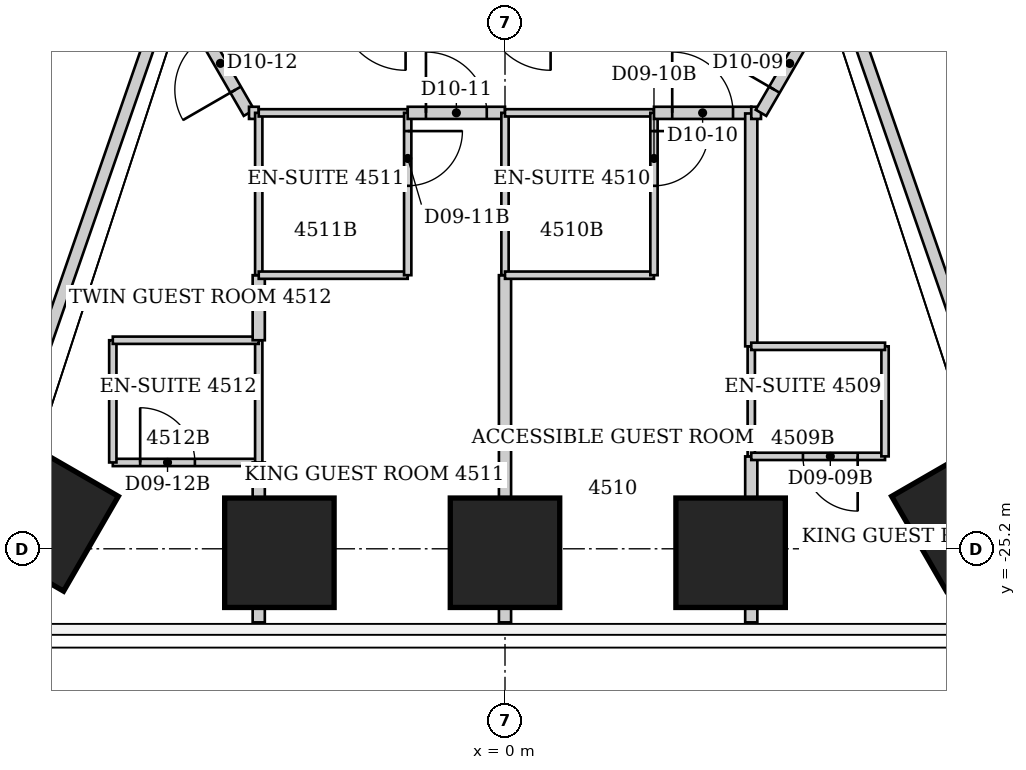
"""IFC4 building model, lengths in metres.
Left out: names, types, materials, properties, quantities, classifications, styles, units other than length and angle.
Written with IfcOpenShell. Run it as: python <this file> out.ifc"""

import sys

from ifc_helpers import new_model, si_unit, direction, frame, frame_2d, origin, origin_2d, place, context, subcontext, project, spatial, rectangle, extrude, element, fill, save


model = new_model("IFC4")
c1 = context("Model", 3, precision=1e-05, world=origin(), true_north=direction((0.0, 1.0)))
c2 = subcontext(c1, "Body", "Model", "MODEL_VIEW")
j1 = project(units=[si_unit("LENGTHUNIT", "METRE"), si_unit("PLANEANGLEUNIT", "RADIAN")], contexts=[c1])
p1 = place(None, origin())
s1 = spatial("IfcSite", under=j1, at=p1, CompositionType="ELEMENT")
p2 = place(p1, origin())
s2 = spatial("IfcBuilding", under=s1, at=p2, CompositionType="ELEMENT")
p3 = place(p2, frame((0.0, 0.0, 183.2)))
s3 = spatial("IfcBuildingStorey", under=s2, at=p3, CompositionType="ELEMENT", Elevation=183.2)
p4 = place(p3, frame((7.979, -24.442, 0.0), z_axis=(0.0, 0.0, 1.0), x_axis=(0.5, -0.866025403784, 0.0)))
e1 = element("IfcColumn", 1, at=p4, inside=s3, PredefinedType="COLUMN", context=c2, shape_type="SweptSolid", body=[
    extrude(rectangle(XDim=1.8, YDim=2.7, at=origin_2d()), origin(), (0.0, 0.0, 1.0), 3.8),
])
for number, where, z_axis, x_axis in (
    (2, (3.71, -25.265, 0.0), (0.0, 0.0, 1.0), (0.0, -1.0, 0.0)),
    (3, (0.0, -25.265, 0.0), (0.0, 0.0, 1.0), (0.0, -1.0, 0.0)),
    (4, (-3.71, -25.265, 0.0), (0.0, 0.0, 1.0), (0.0, -1.0, 0.0)),
):
    element("IfcColumn", number, at=place(p3, frame(where, z_axis=z_axis, x_axis=x_axis)), inside=s3, PredefinedType="COLUMN", context=c2, shape_type="SweptSolid", body=[
        extrude(rectangle(XDim=1.8, YDim=1.8, at=origin_2d()), origin(), (0.0, 0.0, 1.0), 3.8),
    ])
p5 = place(p3, frame((-7.979, -24.442, 0.0), z_axis=(0.0, 0.0, 1.0), x_axis=(-0.5, -0.866025403784, 0.0)))
e5 = element("IfcColumn", 5, at=p5, inside=s3, PredefinedType="COLUMN", context=c2, shape_type="SweptSolid", body=[
    extrude(rectangle(XDim=1.8, YDim=2.7, at=origin_2d()), origin(), (0.0, 0.0, 1.0), 3.8),
])
p6 = place(p3, frame((-9.01, -26.012, 0.0), z_axis=(0.0, 0.0, 1.0), x_axis=(0.327582991606, 0.944822408504, 0.0)))
e6 = element("IfcWall", 6, at=p6, inside=s3, PredefinedType="PARTITIONING", context=c2, shape_type="SweptSolid", body=[
    extrude(rectangle(XDim=10.667, YDim=0.2, at=frame_2d((5.333, 0.0))), origin(), (0.0, 0.0, 1.0), 3.64),
])
p7 = place(p3, frame((-6.45, -23.78, 0.0), z_axis=(0.0, 0.0, 1.0), x_axis=(1.0, 0.0, 0.0)))
e7 = element("IfcWall", 7, at=p7, inside=s3, PredefinedType="PARTITIONING", context=c2, shape_type="SweptSolid", body=[
    extrude(rectangle(XDim=2.4, YDim=0.12, at=frame_2d((1.2, 0.0))), origin(), (0.0, 0.0, 1.0), 3.64),
])
p8 = place(p7, frame((0.45, 0.0, 0.0)))
e8 = element("IfcOpeningElement", 8, at=p8, cuts=e7, PredefinedType="OPENING", context=c2, shape_type="SweptSolid", body=[
    extrude(rectangle(XDim=0.9, YDim=2.03, at=frame_2d((0.45, 1.015))), frame((0.0, 0.06, 0.0), z_axis=(0.0, -1.0, 0.0), x_axis=(1.0, 0.0, 0.0)), (0.0, 0.0, 1.0), 0.12),
])
p9 = place(p3, frame((-6.45, -21.77, 0.0), z_axis=(0.0, 0.0, 1.0), x_axis=(0.0, -1.0, 0.0)))
e9 = element("IfcWall", 9, at=p9, inside=s3, PredefinedType="PARTITIONING", context=c2, shape_type="SweptSolid", body=[
    extrude(rectangle(XDim=2.01, YDim=0.12, at=frame_2d((1.005, 0.0))), origin(), (0.0, 0.0, 1.0), 3.64),
])
p10 = place(p3, frame((-5.48, -15.83, 0.0), z_axis=(0.0, 0.0, 1.0), x_axis=(0.499963722229, -0.866046347752, 0.0)))
e10 = element("IfcWall", 10, at=p10, inside=s3, PredefinedType="PARTITIONING", context=c2, shape_type="SweptSolid", body=[
    extrude(rectangle(XDim=2.54, YDim=0.2, at=frame_2d((1.27, 0.0))), origin(), (0.0, 0.0, 1.0), 3.64),
])
p11 = place(p10, frame((1.1, 0.0, 0.0)))
e11 = element("IfcOpeningElement", 11, at=p11, cuts=e10, PredefinedType="OPENING", context=c2, shape_type="SweptSolid", body=[
    extrude(rectangle(XDim=1.0, YDim=2.13, at=frame_2d((0.5, 1.065))), frame((0.0, 0.1, 0.0), z_axis=(0.0, -1.0, 0.0), x_axis=(1.0, 0.0, 0.0)), (0.0, 0.0, 1.0), 0.2),
])
p12 = place(p3, frame((-4.21, -18.03, 0.0), z_axis=(0.0, 0.0, 1.0), x_axis=(1.0, 0.0, 0.0)))
e12 = element("IfcWall", 12, at=p12, inside=s3, PredefinedType="PARTITIONING", context=c2, shape_type="SweptSolid", body=[
    extrude(rectangle(XDim=0.16, YDim=0.2, at=frame_2d((0.08, 0.0))), origin(), (0.0, 0.0, 1.0), 3.64),
])
p13 = place(p3, frame((-4.05, -26.41, 0.0), z_axis=(0.0, 0.0, 1.0), x_axis=(0.0, 1.0, 0.0)))
e13 = element("IfcWall", 13, at=p13, inside=s3, PredefinedType="PARTITIONING", context=c2, shape_type="SweptSolid", body=[
    extrude(rectangle(XDim=2.63, YDim=0.2, at=frame_2d((1.315, 0.0))), origin(), (0.0, 0.0, 1.0), 3.64),
])
p14 = place(p3, frame((-4.05, -23.78, 0.0), z_axis=(0.0, 0.0, 1.0), x_axis=(0.0, 1.0, 0.0)))
e14 = element("IfcWall", 14, at=p14, inside=s3, PredefinedType="PARTITIONING", context=c2, shape_type="SweptSolid", body=[
    extrude(rectangle(XDim=2.01, YDim=0.12, at=frame_2d((1.005, 0.0))), origin(), (0.0, 0.0, 1.0), 3.64),
])
p15 = place(p3, frame((-4.05, -21.77, 0.0), z_axis=(0.0, 0.0, 1.0), x_axis=(-1.0, 0.0, 0.0)))
e15 = element("IfcWall", 15, at=p15, inside=s3, PredefinedType="PARTITIONING", context=c2, shape_type="SweptSolid", body=[
    extrude(rectangle(XDim=2.4, YDim=0.12, at=frame_2d((1.2, 0.0))), origin(), (0.0, 0.0, 1.0), 3.64),
])
p16 = place(p3, frame((-4.05, -21.77, 0.0), z_axis=(0.0, 0.0, 1.0), x_axis=(0.0, 1.0, 0.0)))
e16 = element("IfcWall", 16, at=p16, inside=s3, PredefinedType="PARTITIONING", context=c2, shape_type="SweptSolid", body=[
    extrude(rectangle(XDim=1.07, YDim=0.2, at=frame_2d((0.535, 0.0))), origin(), (0.0, 0.0, 1.0), 3.64),
])
p17 = place(p3, frame((-4.05, -20.7, 0.0), z_axis=(0.0, 0.0, 1.0), x_axis=(0.0, 1.0, 0.0)))
e17 = element("IfcWall", 17, at=p17, inside=s3, PredefinedType="PARTITIONING", context=c2, shape_type="SweptSolid", body=[
    extrude(rectangle(XDim=2.67, YDim=0.12, at=frame_2d((1.335, 0.0))), origin(), (0.0, 0.0, 1.0), 3.64),
])
for number, where, z_axis, x_axis in (
    (18, (-4.05, -20.7, 0.0), (0.0, 0.0, 1.0), (1.0, 0.0, 0.0)),
    (19, (-4.05, -18.03, 0.0), (0.0, 0.0, 1.0), (1.0, 0.0, 0.0)),
):
    element("IfcWall", number, at=place(p3, frame(where, z_axis=z_axis, x_axis=x_axis)), inside=s3, PredefinedType="PARTITIONING", context=c2, shape_type="SweptSolid", body=[
        extrude(rectangle(XDim=2.45, YDim=0.12, at=frame_2d((1.225, 0.0))), origin(), (0.0, 0.0, 1.0), 3.64),
    ])
p18 = place(p3, frame((-1.6, -20.7, 0.0), z_axis=(0.0, 0.0, 1.0), x_axis=(0.0, 1.0, 0.0)))
e20 = element("IfcWall", 20, at=p18, inside=s3, PredefinedType="PARTITIONING", context=c2, shape_type="SweptSolid", body=[
    extrude(rectangle(XDim=2.67, YDim=0.12, at=frame_2d((1.335, 0.0))), origin(), (0.0, 0.0, 1.0), 3.64),
])
p19 = place(p18, frame((1.47, 0.0, 0.0)))
e21 = element("IfcOpeningElement", 21, at=p19, cuts=e20, PredefinedType="OPENING", context=c2, shape_type="SweptSolid", body=[
    extrude(rectangle(XDim=0.9, YDim=2.03, at=frame_2d((0.45, 1.015))), frame((0.0, 0.06, 0.0), z_axis=(0.0, -1.0, 0.0), x_axis=(1.0, 0.0, 0.0)), (0.0, 0.0, 1.0), 0.12),
])
p20 = place(p3, frame((-1.6, -18.03, 0.0), z_axis=(0.0, 0.0, 1.0), x_axis=(1.0, 0.0, 0.0)))
e22 = element("IfcWall", 22, at=p20, inside=s3, PredefinedType="PARTITIONING", context=c2, shape_type="SweptSolid", body=[
    extrude(rectangle(XDim=1.6, YDim=0.2, at=frame_2d((0.8, 0.0))), origin(), (0.0, 0.0, 1.0), 3.64),
])
p21 = place(p20, frame((0.3, 0.0, 0.0)))
e23 = element("IfcOpeningElement", 23, at=p21, cuts=e22, PredefinedType="OPENING", context=c2, shape_type="SweptSolid", body=[
    extrude(rectangle(XDim=1.0, YDim=2.13, at=frame_2d((0.5, 1.065))), frame((0.0, 0.1, 0.0), z_axis=(0.0, -1.0, 0.0), x_axis=(1.0, 0.0, 0.0)), (0.0, 0.0, 1.0), 0.2),
])
p22 = place(p3, frame((0.0, -26.41, 0.0), z_axis=(0.0, 0.0, 1.0), x_axis=(0.0, 1.0, 0.0)))
e24 = element("IfcWall", 24, at=p22, inside=s3, PredefinedType="PARTITIONING", context=c2, shape_type="SweptSolid", body=[
    extrude(rectangle(XDim=5.71, YDim=0.2, at=frame_2d((2.855, 0.0))), origin(), (0.0, 0.0, 1.0), 2.726),
])
p23 = place(p3, frame((0.0, -20.7, 0.0), z_axis=(0.0, 0.0, 1.0), x_axis=(0.0, 1.0, 0.0)))
e25 = element("IfcWall", 25, at=p23, inside=s3, PredefinedType="PARTITIONING", context=c2, shape_type="SweptSolid", body=[
    extrude(rectangle(XDim=2.67, YDim=0.12, at=frame_2d((1.335, 0.0))), origin(), (0.0, 0.0, 1.0), 2.726),
])
for number, where, z_axis, x_axis in (
    (26, (0.0, -20.7, 0.0), (0.0, 0.0, 1.0), (1.0, 0.0, 0.0)),
    (27, (0.0, -18.03, 0.0), (0.0, 0.0, 1.0), (1.0, 0.0, 0.0)),
):
    element("IfcWall", number, at=place(p3, frame(where, z_axis=z_axis, x_axis=x_axis)), inside=s3, PredefinedType="PARTITIONING", context=c2, shape_type="SweptSolid", body=[
        extrude(rectangle(XDim=2.45, YDim=0.12, at=frame_2d((1.225, 0.0))), origin(), (0.0, 0.0, 1.0), 3.64),
    ])
p24 = place(p3, frame((2.45, -20.7, 0.0), z_axis=(0.0, 0.0, 1.0), x_axis=(0.0, 1.0, 0.0)))
e28 = element("IfcWall", 28, at=p24, inside=s3, PredefinedType="PARTITIONING", context=c2, shape_type="SweptSolid", body=[
    extrude(rectangle(XDim=2.67, YDim=0.12, at=frame_2d((1.335, 0.0))), origin(), (0.0, 0.0, 1.0), 3.64),
])
p25 = place(p24, frame((1.47, 0.0, 0.0)))
e29 = element("IfcOpeningElement", 29, at=p25, cuts=e28, PredefinedType="OPENING", context=c2, shape_type="SweptSolid", body=[
    extrude(rectangle(XDim=0.9, YDim=2.03, at=frame_2d((0.45, 1.015))), frame((0.0, 0.06, 0.0), z_axis=(0.0, -1.0, 0.0), x_axis=(1.0, 0.0, 0.0)), (0.0, 0.0, 1.0), 0.12),
])
p26 = place(p3, frame((2.45, -18.03, 0.0), z_axis=(0.0, 0.0, 1.0), x_axis=(1.0, 0.0, 0.0)))
e30 = element("IfcWall", 30, at=p26, inside=s3, PredefinedType="PARTITIONING", context=c2, shape_type="SweptSolid", body=[
    extrude(rectangle(XDim=1.6, YDim=0.2, at=frame_2d((0.8, 0.0))), origin(), (0.0, 0.0, 1.0), 3.64),
])
p27 = place(p26, frame((0.3, 0.0, 0.0)))
e31 = element("IfcOpeningElement", 31, at=p27, cuts=e30, PredefinedType="OPENING", context=c2, shape_type="SweptSolid", body=[
    extrude(rectangle(XDim=1.0, YDim=2.13, at=frame_2d((0.5, 1.065))), frame((0.0, 0.1, 0.0), z_axis=(0.0, -1.0, 0.0), x_axis=(1.0, 0.0, 0.0)), (0.0, 0.0, 1.0), 0.2),
])
p28 = place(p3, frame((4.05, -26.41, 0.0), z_axis=(0.0, 0.0, 1.0), x_axis=(0.0, 1.0, 0.0)))
e32 = element("IfcWall", 32, at=p28, inside=s3, PredefinedType="PARTITIONING", context=c2, shape_type="SweptSolid", body=[
    extrude(rectangle(XDim=2.73, YDim=0.2, at=frame_2d((1.365, 0.0))), origin(), (0.0, 0.0, 1.0), 3.64),
])
p29 = place(p3, frame((4.05, -23.68, 0.0), z_axis=(0.0, 0.0, 1.0), x_axis=(0.0, 1.0, 0.0)))
e33 = element("IfcWall", 33, at=p29, inside=s3, PredefinedType="PARTITIONING", context=c2, shape_type="SweptSolid", body=[
    extrude(rectangle(XDim=1.81, YDim=0.12, at=frame_2d((0.905, 0.0))), origin(), (0.0, 0.0, 1.0), 3.64),
])
p30 = place(p3, frame((4.05, -23.68, 0.0), z_axis=(0.0, 0.0, 1.0), x_axis=(1.0, 0.0, 0.0)))
e34 = element("IfcWall", 34, at=p30, inside=s3, PredefinedType="PARTITIONING", context=c2, shape_type="SweptSolid", body=[
    extrude(rectangle(XDim=2.2, YDim=0.12, at=frame_2d((1.1, 0.0))), origin(), (0.0, 0.0, 1.0), 3.64),
])
p31 = place(p30, frame((0.85, 0.0, 0.0)))
e35 = element("IfcOpeningElement", 35, at=p31, cuts=e34, PredefinedType="OPENING", context=c2, shape_type="SweptSolid", body=[
    extrude(rectangle(XDim=0.9, YDim=2.03, at=frame_2d((0.45, 1.015))), frame((0.0, 0.06, 0.0), z_axis=(0.0, -1.0, 0.0), x_axis=(1.0, 0.0, 0.0)), (0.0, 0.0, 1.0), 0.12),
])
p32 = place(p3, frame((4.05, -21.87, 0.0), z_axis=(0.0, 0.0, 1.0), x_axis=(0.0, 1.0, 0.0)))
e36 = element("IfcWall", 36, at=p32, inside=s3, PredefinedType="PARTITIONING", context=c2, shape_type="SweptSolid", body=[
    extrude(rectangle(XDim=3.83, YDim=0.2, at=frame_2d((1.915, 0.0))), origin(), (0.0, 0.0, 1.0), 3.64),
])
p33 = place(p3, frame((4.05, -18.03, 0.0), z_axis=(0.0, 0.0, 1.0), x_axis=(1.0, 0.0, 0.0)))
e37 = element("IfcWall", 37, at=p33, inside=s3, PredefinedType="PARTITIONING", context=c2, shape_type="SweptSolid", body=[
    extrude(rectangle(XDim=0.16, YDim=0.2, at=frame_2d((0.08, 0.0))), origin(), (0.0, 0.0, 1.0), 3.64),
])
p34 = place(p3, frame((5.51, -15.79, 0.0), z_axis=(0.0, 0.0, 1.0), x_axis=(-0.501964949025, -0.864887963814, 0.0)))
e38 = element("IfcWall", 38, at=p34, inside=s3, PredefinedType="PARTITIONING", context=c2, shape_type="SweptSolid", body=[
    extrude(rectangle(XDim=2.59, YDim=0.2, at=frame_2d((1.295, 0.0))), origin(), (0.0, 0.0, 1.0), 3.64),
])
p35 = place(p34, frame((1.15, 0.0, 0.0)))
e39 = element("IfcOpeningElement", 39, at=p35, cuts=e38, PredefinedType="OPENING", context=c2, shape_type="SweptSolid", body=[
    extrude(rectangle(XDim=1.0, YDim=2.13, at=frame_2d((0.5, 1.065))), frame((0.0, 0.1, 0.0), z_axis=(0.0, -1.0, 0.0), x_axis=(1.0, 0.0, 0.0)), (0.0, 0.0, 1.0), 0.2),
])
p36 = place(p3, frame((5.522, -15.951, 0.0), z_axis=(0.0, 0.0, 1.0), x_axis=(0.327588517074, -0.944820492729, 0.0)))
e40 = element("IfcWall", 40, at=p36, inside=s3, PredefinedType="PARTITIONING", context=c2, shape_type="SweptSolid", body=[
    extrude(rectangle(XDim=10.648, YDim=0.2, at=frame_2d((5.324, 0.0))), origin(), (0.0, 0.0, 1.0), 3.64),
])
p37 = place(p3, frame((5.615, -15.975, 0.0), z_axis=(0.0, 0.0, 1.0), x_axis=(0.864873056518, -0.501990633487, 0.0)))
e41 = element("IfcWall", 41, at=p37, inside=s3, PredefinedType="PARTITIONING", context=c2, shape_type="SweptSolid", body=[
    extrude(rectangle(XDim=2.48, YDim=0.12, at=frame_2d((1.24, 0.0))), origin(), (0.0, 0.0, 1.0), 3.038),
])
p38 = place(p3, frame((6.25, -23.68, 0.0), z_axis=(0.0, 0.0, 1.0), x_axis=(0.0, 1.0, 0.0)))
e42 = element("IfcWall", 42, at=p38, inside=s3, PredefinedType="PARTITIONING", context=c2, shape_type="SweptSolid", body=[
    extrude(rectangle(XDim=1.81, YDim=0.12, at=frame_2d((0.905, 0.0))), origin(), (0.0, 0.0, 1.0), 3.64),
])
p39 = place(p3, frame((6.25, -21.87, 0.0), z_axis=(0.0, 0.0, 1.0), x_axis=(-1.0, 0.0, 0.0)))
e43 = element("IfcWall", 43, at=p39, inside=s3, PredefinedType="PARTITIONING", context=c2, shape_type="SweptSolid", body=[
    extrude(rectangle(XDim=2.2, YDim=0.12, at=frame_2d((1.1, 0.0))), origin(), (0.0, 0.0, 1.0), 3.64),
])
p40 = place(p35, origin())
e44 = element("IfcDoor", 44, at=p40, inside=s3, OperationType="SINGLE_SWING_RIGHT", PredefinedType="DOOR", context=c2, shape_type="SweptSolid", body=[
    extrude(rectangle(XDim=1.0, YDim=2.13, at=frame_2d((0.5, 1.065))), frame((0.0, 0.025, 0.0), z_axis=(0.0, -1.0, 0.0), x_axis=(1.0, 0.0, 0.0)), (0.0, 0.0, 1.0), 0.05),
])
fill(e39, e44)
p41 = place(p31, origin())
e45 = element("IfcDoor", 45, at=p41, inside=s3, OperationType="SINGLE_SWING_RIGHT", PredefinedType="DOOR", context=c2, shape_type="SweptSolid", body=[
    extrude(rectangle(XDim=0.9, YDim=2.03, at=frame_2d((0.45, 1.015))), frame((0.0, 0.025, 0.0), z_axis=(0.0, -1.0, 0.0), x_axis=(1.0, 0.0, 0.0)), (0.0, 0.0, 1.0), 0.05),
])
fill(e35, e45)
p42 = place(p27, origin())
e46 = element("IfcDoor", 46, at=p42, inside=s3, OperationType="SINGLE_SWING_LEFT", PredefinedType="DOOR", context=c2, shape_type="SweptSolid", body=[
    extrude(rectangle(XDim=1.0, YDim=2.13, at=frame_2d((0.5, 1.065))), frame((0.0, 0.025, 0.0), z_axis=(0.0, -1.0, 0.0), x_axis=(1.0, 0.0, 0.0)), (0.0, 0.0, 1.0), 0.05),
])
fill(e31, e46)
p43 = place(p25, origin())
e47 = element("IfcDoor", 47, at=p43, inside=s3, OperationType="SINGLE_SWING_RIGHT", PredefinedType="DOOR", context=c2, shape_type="SweptSolid", body=[
    extrude(rectangle(XDim=0.9, YDim=2.03, at=frame_2d((0.45, 1.015))), frame((0.0, 0.025, 0.0), z_axis=(0.0, -1.0, 0.0), x_axis=(1.0, 0.0, 0.0)), (0.0, 0.0, 1.0), 0.05),
])
fill(e29, e47)
p44 = place(p21, origin())
e48 = element("IfcDoor", 48, at=p44, inside=s3, OperationType="SINGLE_SWING_LEFT", PredefinedType="DOOR", context=c2, shape_type="SweptSolid", body=[
    extrude(rectangle(XDim=1.0, YDim=2.13, at=frame_2d((0.5, 1.065))), frame((0.0, 0.025, 0.0), z_axis=(0.0, -1.0, 0.0), x_axis=(1.0, 0.0, 0.0)), (0.0, 0.0, 1.0), 0.05),
])
fill(e23, e48)
p45 = place(p19, origin())
e49 = element("IfcDoor", 49, at=p45, inside=s3, OperationType="SINGLE_SWING_RIGHT", PredefinedType="DOOR", context=c2, shape_type="SweptSolid", body=[
    extrude(rectangle(XDim=0.9, YDim=2.03, at=frame_2d((0.45, 1.015))), frame((0.0, 0.025, 0.0), z_axis=(0.0, -1.0, 0.0), x_axis=(1.0, 0.0, 0.0)), (0.0, 0.0, 1.0), 0.05),
])
fill(e21, e49)
p46 = place(p11, origin())
e50 = element("IfcDoor", 50, at=p46, inside=s3, OperationType="SINGLE_SWING_RIGHT", PredefinedType="DOOR", context=c2, shape_type="SweptSolid", body=[
    extrude(rectangle(XDim=1.0, YDim=2.13, at=frame_2d((0.5, 1.065))), frame((0.0, 0.025, 0.0), z_axis=(0.0, -1.0, 0.0), x_axis=(1.0, 0.0, 0.0)), (0.0, 0.0, 1.0), 0.05),
])
fill(e11, e50)
p47 = place(p8, origin())
e51 = element("IfcDoor", 51, at=p47, inside=s3, OperationType="SINGLE_SWING_LEFT", PredefinedType="DOOR", context=c2, shape_type="SweptSolid", body=[
    extrude(rectangle(XDim=0.9, YDim=2.03, at=frame_2d((0.45, 1.015))), frame((0.0, 0.025, 0.0), z_axis=(0.0, -1.0, 0.0), x_axis=(1.0, 0.0, 0.0)), (0.0, 0.0, 1.0), 0.05),
])
fill(e8, e51)
save(model, sys.argv[1])
